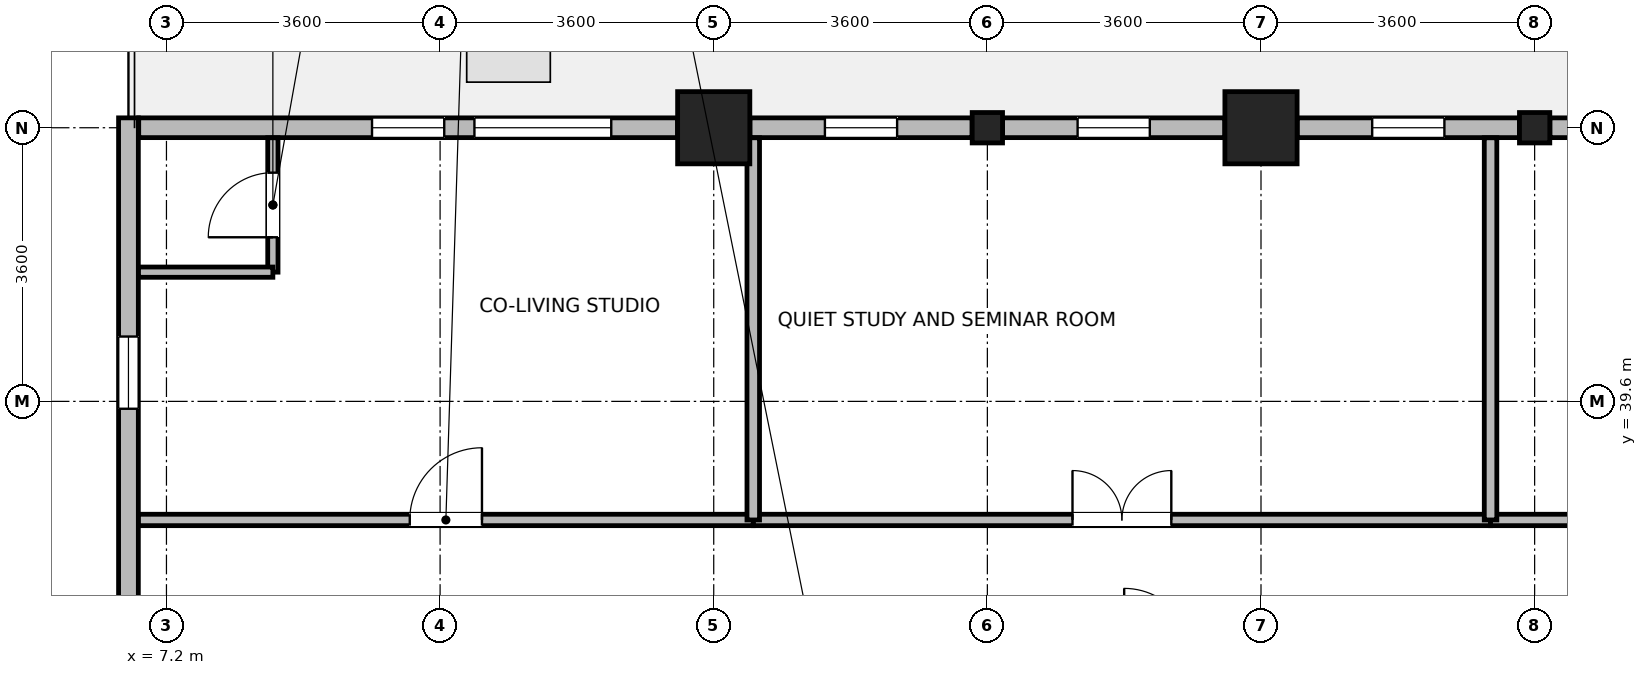
"""IFC4 building model, lengths in metres.
Left out: names, types, materials, properties, quantities, classifications, styles, units other than length and angle.
Written with IfcOpenShell. Run it as: python <this file> out.ifc"""

import sys

from ifc_helpers import new_model, si_unit, direction, frame, frame_2d, origin, origin_2d, place, context, subcontext, project, spatial, rectangle, i_section, extrude, source, transform, mapped, element, fill, save


model = new_model("IFC4")
c1 = context("Model", 3, precision=1e-05, world=origin(), true_north=direction((0.0, 1.0)))
c2 = subcontext(c1, "Body", "Model", "MODEL_VIEW")
j1 = project(units=[si_unit("LENGTHUNIT", "METRE"), si_unit("PLANEANGLEUNIT", "RADIAN")], contexts=[c1])
p1 = place(None, origin())
s1 = spatial("IfcSite", under=j1, at=p1, CompositionType="ELEMENT")
p2 = place(p1, origin())
s2 = spatial("IfcBuilding", under=s1, at=p2, CompositionType="ELEMENT")
p3 = place(p2, frame((0.0, 0.0, 220.3)))
s3 = spatial("IfcBuildingStorey", under=s2, at=p3, CompositionType="ELEMENT", Elevation=220.3)
m1 = source(origin(), c2, "Body", "SweptSolid", [
    extrude(rectangle(XDim=0.95, YDim=0.95, at=origin_2d()), origin(), (0.0, 0.0, 1.0), 3.7),
])
for number, where, z_axis, x_axis in (
    (1, (14.4, 43.2, 0.0), (0.0, 0.0, 1.0), (1.0, 0.0, 0.0)),
    (2, (21.6, 43.2, 0.0), (0.0, 0.0, 1.0), (1.0, 0.0, 0.0)),
):
    element("IfcColumn", number, at=place(p3, frame(where, z_axis=z_axis, x_axis=x_axis)), inside=s3, PredefinedType="COLUMN", context=c2, shape_type="MappedRepresentation", body=[
        mapped(m1, transform((0.0, 0.0, 0.0), x_axis=(1.0, 0.0, 0.0), y_axis=(0.0, 1.0, 0.0), z_axis=(0.0, 0.0, 1.0), scale=1.0)),
    ])
m2 = source(origin(), c2, "Body", "SweptSolid", [
    extrude(i_section(OverallWidth=0.399, OverallDepth=0.4, WebThickness=0.017, FlangeThickness=0.023, FilletRadius=0.015, at=origin_2d()), origin(), (0.0, 0.0, 1.0), 3.7),
])
for number, where, z_axis, x_axis in (
    (3, (18.0, 43.2, 0.0), (0.0, 0.0, 1.0), (1.0, 0.0, 0.0)),
    (4, (25.2, 43.2, 0.0), (0.0, 0.0, 1.0), (1.0, 0.0, 0.0)),
):
    element("IfcColumn", number, at=place(p3, frame(where, z_axis=z_axis, x_axis=x_axis)), inside=s3, PredefinedType="COLUMN", context=c2, shape_type="MappedRepresentation", body=[
        mapped(m2, transform((0.0, 0.0, 0.0), x_axis=(1.0, 0.0, 0.0), y_axis=(0.0, 1.0, 0.0), z_axis=(0.0, 0.0, 1.0), scale=1.0)),
    ])
p4 = place(p3, frame((25.4, 43.2, 0.0), z_axis=(0.0, 0.0, 1.0), x_axis=(1.0, 0.0, 0.0)))
e5 = element("IfcWall", 5, at=p4, inside=s3, PredefinedType="STANDARD", context=c2, shape_type="SweptSolid", body=[
    extrude(rectangle(XDim=2.924, YDim=0.26, at=frame_2d((1.462, 0.0))), origin(), (0.0, 0.0, 1.0), 3.05),
])
p5 = place(p4, frame((0.987, 0.0, 0.85)))
e6 = element("IfcOpeningElement", 6, at=p5, cuts=e5, PredefinedType="OPENING", context=c2, shape_type="SweptSolid", body=[
    extrude(rectangle(XDim=0.95, YDim=1.75, at=frame_2d((0.475, 0.875))), frame((0.0, 0.14, 0.0), z_axis=(0.0, -1.0, 0.0), x_axis=(1.0, 0.0, 0.0)), (0.0, 0.0, 1.0), 0.28),
])
p6 = place(p3, frame((22.076, 43.2, 0.0), z_axis=(0.0, 0.0, 1.0), x_axis=(1.0, 0.0, 0.0)))
e7 = element("IfcWall", 7, at=p6, inside=s3, PredefinedType="STANDARD", context=c2, shape_type="SweptSolid", body=[
    extrude(rectangle(XDim=2.924, YDim=0.26, at=frame_2d((1.462, 0.0))), origin(), (0.0, 0.0, 1.0), 3.05),
])
p7 = place(p6, frame((0.987, 0.0, 0.85)))
e8 = element("IfcOpeningElement", 8, at=p7, cuts=e7, PredefinedType="OPENING", context=c2, shape_type="SweptSolid", body=[
    extrude(rectangle(XDim=0.95, YDim=1.75, at=frame_2d((0.475, 0.875))), frame((0.0, 0.14, 0.0), z_axis=(0.0, -1.0, 0.0), x_axis=(1.0, 0.0, 0.0)), (0.0, 0.0, 1.0), 0.28),
])
p8 = place(p3, frame((18.2, 43.2, 0.0), z_axis=(0.0, 0.0, 1.0), x_axis=(1.0, 0.0, 0.0)))
e9 = element("IfcWall", 9, at=p8, inside=s3, PredefinedType="STANDARD", context=c2, shape_type="SweptSolid", body=[
    extrude(rectangle(XDim=2.924, YDim=0.26, at=frame_2d((1.462, 0.0))), origin(), (0.0, 0.0, 1.0), 3.05),
])
p9 = place(p8, frame((0.987, 0.0, 0.85)))
e10 = element("IfcOpeningElement", 10, at=p9, cuts=e9, PredefinedType="OPENING", context=c2, shape_type="SweptSolid", body=[
    extrude(rectangle(XDim=0.95, YDim=1.75, at=frame_2d((0.475, 0.875))), frame((0.0, 0.14, 0.0), z_axis=(0.0, -1.0, 0.0), x_axis=(1.0, 0.0, 0.0)), (0.0, 0.0, 1.0), 0.28),
])
p10 = place(p3, frame((14.876, 43.2, 0.0), z_axis=(0.0, 0.0, 1.0), x_axis=(1.0, 0.0, 0.0)))
e11 = element("IfcWall", 11, at=p10, inside=s3, PredefinedType="STANDARD", context=c2, shape_type="SweptSolid", body=[
    extrude(rectangle(XDim=2.924, YDim=0.26, at=frame_2d((1.462, 0.0))), origin(), (0.0, 0.0, 1.0), 3.05),
])
p11 = place(p10, frame((0.987, 0.0, 0.85)))
e12 = element("IfcOpeningElement", 12, at=p11, cuts=e11, PredefinedType="OPENING", context=c2, shape_type="SweptSolid", body=[
    extrude(rectangle(XDim=0.95, YDim=1.75, at=frame_2d((0.475, 0.875))), frame((0.0, 0.14, 0.0), z_axis=(0.0, -1.0, 0.0), x_axis=(1.0, 0.0, 0.0)), (0.0, 0.0, 1.0), 0.28),
])
p12 = place(p3, frame((6.835, 43.2, 0.0), z_axis=(0.0, 0.0, 1.0), x_axis=(1.0, 0.0, 0.0)))
e13 = element("IfcWall", 13, at=p12, inside=s3, PredefinedType="STANDARD", context=c2, shape_type="SweptSolid", body=[
    extrude(rectangle(XDim=7.089, YDim=0.26, at=frame_2d((3.544, 0.0))), origin(), (0.0, 0.0, 1.0), 3.45),
])
p13 = place(p12, frame((4.417, 0.0, 0.85)))
e14 = element("IfcOpeningElement", 14, at=p13, cuts=e13, PredefinedType="OPENING", context=c2, shape_type="SweptSolid", body=[
    extrude(rectangle(XDim=1.8, YDim=1.85, at=frame_2d((0.9, 0.925))), frame((0.0, 0.14, 0.0), z_axis=(0.0, -1.0, 0.0), x_axis=(1.0, 0.0, 0.0)), (0.0, 0.0, 1.0), 0.28),
])
p14 = place(p12, frame((3.07, 0.0, 0.85)))
e15 = element("IfcOpeningElement", 15, at=p14, cuts=e13, PredefinedType="OPENING", context=c2, shape_type="SweptSolid", body=[
    extrude(rectangle(XDim=0.95, YDim=1.75, at=frame_2d((0.475, 0.875))), frame((0.0, 0.14, 0.0), z_axis=(0.0, -1.0, 0.0), x_axis=(1.0, 0.0, 0.0)), (0.0, 0.0, 1.0), 0.28),
])
p15 = place(p3, frame((6.7, 36.626, 0.0), z_axis=(0.0, 0.0, 1.0), x_axis=(0.0, 1.0, 0.0)))
e16 = element("IfcWall", 16, at=p15, inside=s3, PredefinedType="STANDARD", context=c2, shape_type="SweptSolid", body=[
    extrude(rectangle(XDim=6.704, YDim=0.26, at=frame_2d((3.352, 0.0))), origin(), (0.0, 0.0, 1.0), 3.45),
])
p16 = place(p15, frame((2.877, 0.0, 0.85)))
e17 = element("IfcOpeningElement", 17, at=p16, cuts=e16, PredefinedType="OPENING", context=c2, shape_type="SweptSolid", body=[
    extrude(rectangle(XDim=0.95, YDim=1.75, at=frame_2d((0.475, 0.875))), frame((0.0, 0.14, 0.0), z_axis=(0.0, -1.0, 0.0), x_axis=(1.0, 0.0, 0.0)), (0.0, 0.0, 1.0), 0.28),
])
p17 = place(p3, frame((8.6, 41.3, 0.0), z_axis=(0.0, 0.0, 1.0), x_axis=(0.0, 1.0, 0.0)))
e18 = element("IfcWall", 18, at=p17, inside=s3, PredefinedType="PARTITIONING", context=c2, shape_type="SweptSolid", body=[
    extrude(rectangle(XDim=1.768, YDim=0.135, at=frame_2d((0.884, 0.0))), origin(), (0.0, 0.0, 1.0), 3.45),
])
p18 = place(p17, frame((0.459, 0.0, 0.0)))
e19 = element("IfcOpeningElement", 19, at=p18, cuts=e18, PredefinedType="OPENING", context=c2, shape_type="SweptSolid", body=[
    extrude(rectangle(XDim=0.85, YDim=2.04, at=frame_2d((0.425, 1.02))), frame((0.0, 0.078, 0.0), z_axis=(0.0, -1.0, 0.0), x_axis=(1.0, 0.0, 0.0)), (0.0, 0.0, 1.0), 0.155),
])
p19 = place(p3, frame((6.832, 41.3, 0.0), z_axis=(0.0, 0.0, 1.0), x_axis=(1.0, 0.0, 0.0)))
e20 = element("IfcWall", 20, at=p19, inside=s3, PredefinedType="PARTITIONING", context=c2, shape_type="SweptSolid", body=[
    extrude(rectangle(XDim=1.768, YDim=0.135, at=frame_2d((0.884, 0.0))), origin(), (0.0, 0.0, 1.0), 3.45),
])
p20 = place(p3, frame((14.92, 38.04, 0.0), z_axis=(0.0, 0.0, 1.0), x_axis=(1.0, 0.0, 0.0)))
e21 = element("IfcWall", 21, at=p20, inside=s3, PredefinedType="PARTITIONING", context=c2, shape_type="SweptSolid", body=[
    extrude(rectangle(XDim=9.7, YDim=0.15, at=frame_2d((4.85, 0.0))), origin(), (0.0, 0.0, 1.0), 3.45),
])
p21 = place(p20, frame((4.2, 0.0, 0.0)))
e22 = element("IfcOpeningElement", 22, at=p21, cuts=e21, PredefinedType="OPENING", context=c2, shape_type="SweptSolid", body=[
    extrude(rectangle(XDim=1.3, YDim=2.12, at=frame_2d((0.65, 1.06))), frame((0.0, 0.085, 0.0), z_axis=(0.0, -1.0, 0.0), x_axis=(1.0, 0.0, 0.0)), (0.0, 0.0, 1.0), 0.17),
])
p22 = place(p3, frame((24.62, 38.04, 0.0), z_axis=(0.0, 0.0, 1.0), x_axis=(1.0, 0.0, 0.0)))
e23 = element("IfcWall", 23, at=p22, inside=s3, PredefinedType="PARTITIONING", context=c2, shape_type="SweptSolid", body=[
    extrude(rectangle(XDim=9.02, YDim=0.15, at=frame_2d((4.51, 0.0))), origin(), (0.0, 0.0, 1.0), 3.45),
])
p23 = place(p22, frame((3.86, 0.0, 0.0)))
e24 = element("IfcOpeningElement", 24, at=p23, cuts=e23, PredefinedType="OPENING", context=c2, shape_type="SweptSolid", body=[
    extrude(rectangle(XDim=1.3, YDim=2.12, at=frame_2d((0.65, 1.06))), frame((0.0, 0.085, 0.0), z_axis=(0.0, -1.0, 0.0), x_axis=(1.0, 0.0, 0.0)), (0.0, 0.0, 1.0), 0.17),
])
p24 = place(p3, frame((6.832, 38.04, 0.0), z_axis=(0.0, 0.0, 1.0), x_axis=(1.0, 0.0, 0.0)))
e25 = element("IfcWall", 25, at=p24, inside=s3, PredefinedType="PARTITIONING", context=c2, shape_type="SweptSolid", body=[
    extrude(rectangle(XDim=8.088, YDim=0.15, at=frame_2d((4.044, 0.0))), origin(), (0.0, 0.0, 1.0), 3.45),
])
p25 = place(p24, frame((3.569, 0.0, 0.0)))
e26 = element("IfcOpeningElement", 26, at=p25, cuts=e25, PredefinedType="OPENING", context=c2, shape_type="SweptSolid", body=[
    extrude(rectangle(XDim=0.95, YDim=2.1, at=frame_2d((0.475, 1.05))), frame((0.0, 0.085, 0.0), z_axis=(0.0, -1.0, 0.0), x_axis=(1.0, 0.0, 0.0)), (0.0, 0.0, 1.0), 0.17),
])
for number, where, z_axis, x_axis in (
    (27, (14.92, 38.04, 0.0), (0.0, 0.0, 1.0), (0.0, 1.0, 0.0)),
    (28, (24.62, 38.04, 0.0), (0.0, 0.0, 1.0), (0.0, 1.0, 0.0)),
):
    element("IfcWall", number, at=place(p3, frame(where, z_axis=z_axis, x_axis=x_axis)), inside=s3, PredefinedType="PARTITIONING", context=c2, shape_type="SweptSolid", body=[
        extrude(rectangle(XDim=5.028, YDim=0.165, at=frame_2d((2.514, 0.0))), origin(), (0.0, 0.0, 1.0), 3.45),
    ])
p26 = place(p7, origin())
e29 = element("IfcWindow", 29, at=p26, inside=s3, PartitioningType="SINGLE_PANEL", PredefinedType="WINDOW", context=c2, shape_type="SweptSolid", body=[
    extrude(rectangle(XDim=0.95, YDim=1.75, at=frame_2d((0.475, 0.875))), frame((0.0, 0.03, 0.0), z_axis=(0.0, -1.0, 0.0), x_axis=(1.0, 0.0, 0.0)), (0.0, 0.0, 1.0), 0.06),
])
fill(e8, e29)
p27 = place(p9, origin())
e30 = element("IfcWindow", 30, at=p27, inside=s3, PartitioningType="SINGLE_PANEL", PredefinedType="WINDOW", context=c2, shape_type="SweptSolid", body=[
    extrude(rectangle(XDim=0.95, YDim=1.75, at=frame_2d((0.475, 0.875))), frame((0.0, 0.03, 0.0), z_axis=(0.0, -1.0, 0.0), x_axis=(1.0, 0.0, 0.0)), (0.0, 0.0, 1.0), 0.06),
])
fill(e10, e30)
p28 = place(p11, origin())
e31 = element("IfcWindow", 31, at=p28, inside=s3, PartitioningType="SINGLE_PANEL", PredefinedType="WINDOW", context=c2, shape_type="SweptSolid", body=[
    extrude(rectangle(XDim=0.95, YDim=1.75, at=frame_2d((0.475, 0.875))), frame((0.0, 0.03, 0.0), z_axis=(0.0, -1.0, 0.0), x_axis=(1.0, 0.0, 0.0)), (0.0, 0.0, 1.0), 0.06),
])
fill(e12, e31)
p29 = place(p13, origin())
e32 = element("IfcWindow", 32, at=p29, inside=s3, PartitioningType="SINGLE_PANEL", PredefinedType="WINDOW", context=c2, shape_type="SweptSolid", body=[
    extrude(rectangle(XDim=1.8, YDim=1.85, at=frame_2d((0.9, 0.925))), frame((0.0, 0.03, 0.0), z_axis=(0.0, -1.0, 0.0), x_axis=(1.0, 0.0, 0.0)), (0.0, 0.0, 1.0), 0.06),
])
fill(e14, e32)
p30 = place(p14, origin())
e33 = element("IfcWindow", 33, at=p30, inside=s3, PartitioningType="SINGLE_PANEL", PredefinedType="WINDOW", context=c2, shape_type="SweptSolid", body=[
    extrude(rectangle(XDim=0.95, YDim=1.75, at=frame_2d((0.475, 0.875))), frame((0.0, 0.03, 0.0), z_axis=(0.0, -1.0, 0.0), x_axis=(1.0, 0.0, 0.0)), (0.0, 0.0, 1.0), 0.06),
])
fill(e15, e33)
p31 = place(p16, origin())
e34 = element("IfcWindow", 34, at=p31, inside=s3, PartitioningType="SINGLE_PANEL", PredefinedType="WINDOW", context=c2, shape_type="SweptSolid", body=[
    extrude(rectangle(XDim=0.95, YDim=1.75, at=frame_2d((0.475, 0.875))), frame((0.0, 0.03, 0.0), z_axis=(0.0, -1.0, 0.0), x_axis=(1.0, 0.0, 0.0)), (0.0, 0.0, 1.0), 0.06),
])
fill(e17, e34)
p32 = place(p18, origin())
e35 = element("IfcDoor", 35, at=p32, inside=s3, OperationType="SINGLE_SWING_LEFT", PredefinedType="DOOR", context=c2, shape_type="SweptSolid", body=[
    extrude(rectangle(XDim=0.85, YDim=2.04, at=frame_2d((0.425, 1.02))), frame((0.0, 0.025, 0.0), z_axis=(0.0, -1.0, 0.0), x_axis=(1.0, 0.0, 0.0)), (0.0, 0.0, 1.0), 0.05),
])
fill(e19, e35)
p33 = place(p21, origin())
e36 = element("IfcDoor", 36, at=p33, inside=s3, OperationType="DOUBLE_DOOR_SINGLE_SWING", PredefinedType="DOOR", context=c2, shape_type="SweptSolid", body=[
    extrude(rectangle(XDim=1.3, YDim=2.12, at=frame_2d((0.65, 1.06))), frame((0.0, 0.025, 0.0), z_axis=(0.0, -1.0, 0.0), x_axis=(1.0, 0.0, 0.0)), (0.0, 0.0, 1.0), 0.05),
])
fill(e22, e36)
p34 = place(p25, origin())
e37 = element("IfcDoor", 37, at=p34, inside=s3, OperationType="SINGLE_SWING_RIGHT", PredefinedType="DOOR", context=c2, shape_type="SweptSolid", body=[
    extrude(rectangle(XDim=0.95, YDim=2.1, at=frame_2d((0.475, 1.05))), frame((0.0, 0.025, 0.0), z_axis=(0.0, -1.0, 0.0), x_axis=(1.0, 0.0, 0.0)), (0.0, 0.0, 1.0), 0.05),
])
fill(e26, e37)
save(model, sys.argv[1])
